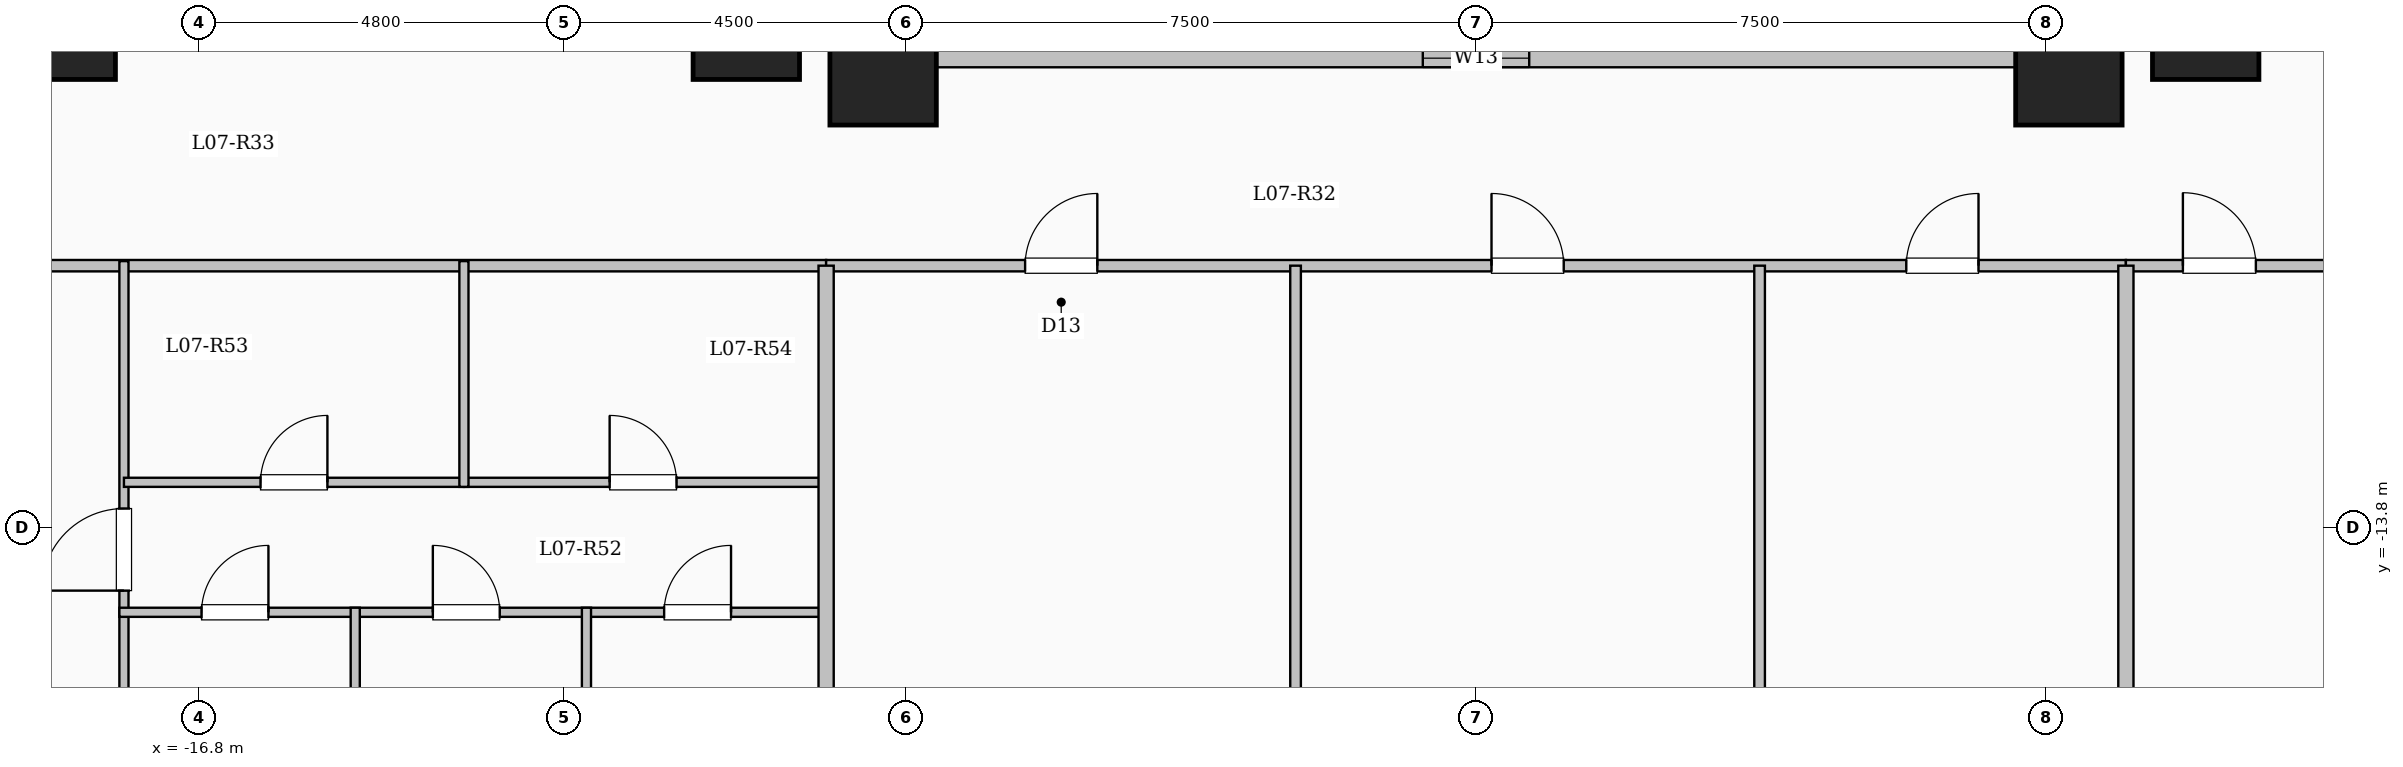
"""IFC4 building model, lengths in metres.
Left out: names, types, materials, properties, quantities, classifications, styles, units other than length and angle.
Written with IfcOpenShell. Run it as: python <this file> out.ifc"""

import sys

from ifc_helpers import new_model, si_unit, direction, frame, frame_2d, origin, origin_2d, place, context, subcontext, project, spatial, rectangle, extrude, element, fill, save


model = new_model("IFC4")
c1 = context("Model", 3, precision=1e-05, world=origin(), true_north=direction((0.0, 1.0)))
c2 = subcontext(c1, "Body", "Model", "MODEL_VIEW")
j1 = project(units=[si_unit("LENGTHUNIT", "METRE"), si_unit("PLANEANGLEUNIT", "RADIAN")], contexts=[c1])
p1 = place(None, origin())
s1 = spatial("IfcSite", under=j1, at=p1, CompositionType="ELEMENT")
p2 = place(p1, origin())
s2 = spatial("IfcBuilding", under=s1, at=p2, CompositionType="ELEMENT")
p3 = place(p2, frame((0.0, 0.0, 30.7)))
s3 = spatial("IfcBuildingStorey", under=s2, at=p3, CompositionType="ELEMENT", Elevation=30.7)
for number, where, z_axis, x_axis in (
    (1, (-7.8, -7.8, 0.0), (0.0, 0.0, 1.0), (1.0, 0.0, 0.0)),
    (2, (7.8, -7.8, 0.0), (0.0, 0.0, 1.0), (1.0, 0.0, 0.0)),
    (3, (-9.6, -7.2, 0.0), (0.0, 0.0, 1.0), (1.0, 0.0, 0.0)),
    (4, (9.6, -7.2, 0.0), (0.0, 0.0, 1.0), (1.0, 0.0, 0.0)),
    (5, (-18.6, -7.2, 0.0), (0.0, 0.0, 1.0), (1.0, 0.0, 0.0)),
):
    element("IfcColumn", number, at=place(p3, frame(where, z_axis=z_axis, x_axis=x_axis)), inside=s3, PredefinedType="COLUMN", context=c2, shape_type="SweptSolid", body=[
        extrude(rectangle(XDim=1.4, YDim=1.4, at=origin_2d()), origin(), (0.0, 0.0, 1.0), 3.35),
    ])
p4 = place(p3, frame((-7.62, -7.62, 0.0), z_axis=(0.0, 0.0, 1.0), x_axis=(1.0, 0.0, 0.0)))
e6 = element("IfcWall", 6, at=p4, inside=s3, PredefinedType="SOLIDWALL", context=c2, shape_type="SweptSolid", body=[
    extrude(rectangle(XDim=15.24, YDim=0.24, at=frame_2d((7.62, 0.0))), origin(), (0.0, 0.0, 1.0), 3.1),
])
p5 = place(p4, frame((6.92, 0.0, 0.95)))
e7 = element("IfcOpeningElement", 7, at=p5, cuts=e6, PredefinedType="OPENING", context=c2, shape_type="SweptSolid", body=[
    extrude(rectangle(XDim=1.4, YDim=1.5, at=frame_2d((0.7, 0.75))), frame((0.0, 0.13, 0.0), z_axis=(0.0, -1.0, 0.0), x_axis=(1.0, 0.0, 0.0)), (0.0, 0.0, 1.0), 0.26),
])
p6 = place(p3, frame((7.62, -7.62, 0.0), z_axis=(0.0, 0.0, 1.0), x_axis=(0.0, 1.0, 0.0)))
e8 = element("IfcWall", 8, at=p6, inside=s3, PredefinedType="SOLIDWALL", context=c2, shape_type="SweptSolid", body=[
    extrude(rectangle(XDim=15.24, YDim=0.24, at=frame_2d((7.62, 0.0))), origin(), (0.0, 0.0, 1.0), 3.1),
])
p7 = place(p6, frame((6.92, 0.0, 0.95)))
e9 = element("IfcOpeningElement", 9, at=p7, cuts=e8, PredefinedType="OPENING", context=c2, shape_type="SweptSolid", body=[
    extrude(rectangle(XDim=1.4, YDim=1.5, at=frame_2d((0.7, 0.75))), frame((0.0, 0.13, 0.0), z_axis=(0.0, -1.0, 0.0), x_axis=(1.0, 0.0, 0.0)), (0.0, 0.0, 1.0), 0.26),
])
p8 = place(p3, frame((-7.62, 7.62, 0.0), z_axis=(0.0, 0.0, 1.0), x_axis=(0.0, -1.0, 0.0)))
e10 = element("IfcWall", 10, at=p8, inside=s3, PredefinedType="SOLIDWALL", context=c2, shape_type="SweptSolid", body=[
    extrude(rectangle(XDim=15.24, YDim=0.24, at=frame_2d((7.62, 0.0))), origin(), (0.0, 0.0, 1.0), 3.1),
])
p9 = place(p8, frame((6.92, 0.0, 0.95)))
e11 = element("IfcOpeningElement", 11, at=p9, cuts=e10, PredefinedType="OPENING", context=c2, shape_type="SweptSolid", body=[
    extrude(rectangle(XDim=1.4, YDim=1.5, at=frame_2d((0.7, 0.75))), frame((0.0, 0.13, 0.0), z_axis=(0.0, -1.0, 0.0), x_axis=(1.0, 0.0, 0.0)), (0.0, 0.0, 1.0), 0.26),
])
p10 = place(p3, frame((-22.55, -10.35, 0.0), z_axis=(0.0, 0.0, 1.0), x_axis=(1.0, 0.0, 0.0)))
e12 = element("IfcWall", 12, at=p10, inside=s3, PredefinedType="PARTITIONING", context=c2, shape_type="SweptSolid", body=[
    extrude(rectangle(XDim=14.0, YDim=0.15, at=frame_2d((7.0, 0.0))), origin(), (0.0, 0.0, 1.0), 3.1),
])
p11 = place(p10, frame((0.7, 0.0, 0.0)))
e13 = element("IfcOpeningElement", 13, at=p11, cuts=e12, PredefinedType="OPENING", context=c2, shape_type="SweptSolid", body=[
    extrude(rectangle(XDim=0.96, YDim=2.15, at=frame_2d((0.48, 1.075))), frame((0.0, 0.085, 0.0), z_axis=(0.0, -1.0, 0.0), x_axis=(1.0, 0.0, 0.0)), (0.0, 0.0, 1.0), 0.17),
])
p12 = place(p3, frame((-8.55, -10.35, 0.0), z_axis=(0.0, 0.0, 1.0), x_axis=(1.0, 0.0, 0.0)))
e14 = element("IfcWall", 14, at=p12, inside=s3, PredefinedType="PARTITIONING", context=c2, shape_type="SweptSolid", body=[
    extrude(rectangle(XDim=17.1, YDim=0.15, at=frame_2d((8.55, 0.0))), origin(), (0.0, 0.0, 1.0), 3.1),
])
p13 = place(p12, frame((2.618, 0.0, 0.0)))
e15 = element("IfcOpeningElement", 15, at=p13, cuts=e14, PredefinedType="OPENING", context=c2, shape_type="SweptSolid", body=[
    extrude(rectangle(XDim=0.95, YDim=2.15, at=frame_2d((0.475, 1.075))), frame((0.0, 0.085, 0.0), z_axis=(0.0, -1.0, 0.0), x_axis=(1.0, 0.0, 0.0)), (0.0, 0.0, 1.0), 0.17),
])
p14 = place(p12, frame((8.754, 0.0, 0.0)))
e16 = element("IfcOpeningElement", 16, at=p14, cuts=e14, PredefinedType="OPENING", context=c2, shape_type="SweptSolid", body=[
    extrude(rectangle(XDim=0.95, YDim=2.15, at=frame_2d((0.475, 1.075))), frame((0.0, 0.085, 0.0), z_axis=(0.0, -1.0, 0.0), x_axis=(1.0, 0.0, 0.0)), (0.0, 0.0, 1.0), 0.17),
])
p15 = place(p12, frame((14.211, 0.0, 0.0)))
e17 = element("IfcOpeningElement", 17, at=p15, cuts=e14, PredefinedType="OPENING", context=c2, shape_type="SweptSolid", body=[
    extrude(rectangle(XDim=0.95, YDim=2.15, at=frame_2d((0.475, 1.075))), frame((0.0, 0.085, 0.0), z_axis=(0.0, -1.0, 0.0), x_axis=(1.0, 0.0, 0.0)), (0.0, 0.0, 1.0), 0.17),
])
p16 = place(p3, frame((8.55, -10.35, 0.0), z_axis=(0.0, 0.0, 1.0), x_axis=(1.0, 0.0, 0.0)))
e18 = element("IfcWall", 18, at=p16, inside=s3, PredefinedType="PARTITIONING", context=c2, shape_type="SweptSolid", body=[
    extrude(rectangle(XDim=14.0, YDim=0.15, at=frame_2d((7.0, 0.0))), origin(), (0.0, 0.0, 1.0), 3.1),
])
p17 = place(p16, frame((0.75, 0.0, 0.0)))
e19 = element("IfcOpeningElement", 19, at=p17, cuts=e18, PredefinedType="OPENING", context=c2, shape_type="SweptSolid", body=[
    extrude(rectangle(XDim=0.96, YDim=2.15, at=frame_2d((0.48, 1.075))), frame((0.0, 0.085, 0.0), z_axis=(0.0, -1.0, 0.0), x_axis=(1.0, 0.0, 0.0)), (0.0, 0.0, 1.0), 0.17),
])
p18 = place(p3, frame((-17.788, -23.6, 0.0), z_axis=(0.0, 0.0, 1.0), x_axis=(0.0, 1.0, 0.0)))
e20 = element("IfcWall", 20, at=p18, inside=s3, PredefinedType="PARTITIONING", context=c2, shape_type="SweptSolid", body=[
    extrude(rectangle(XDim=13.31, YDim=0.12, at=frame_2d((6.655, 0.0))), origin(), (0.0, 0.0, 1.0), 3.1),
])
p19 = place(p18, frame((8.975, 0.0, 0.0)))
e21 = element("IfcOpeningElement", 21, at=p19, cuts=e20, PredefinedType="OPENING", context=c2, shape_type="SweptSolid", body=[
    extrude(rectangle(XDim=1.08, YDim=2.15, at=frame_2d((0.54, 1.075))), frame((0.0, 0.07, 0.0), z_axis=(0.0, -1.0, 0.0), x_axis=(1.0, 0.0, 0.0)), (0.0, 0.0, 1.0), 0.14),
])
p20 = place(p3, frame((-17.788, -13.2, 0.0), z_axis=(0.0, 0.0, 1.0), x_axis=(1.0, 0.0, 0.0)))
e22 = element("IfcWall", 22, at=p20, inside=s3, PredefinedType="PARTITIONING", context=c2, shape_type="SweptSolid", body=[
    extrude(rectangle(XDim=4.473, YDim=0.12, at=frame_2d((2.237, 0.0))), origin(), (0.0, 0.0, 1.0), 3.1),
])
p21 = place(p20, frame((1.797, 0.0, 0.0)))
e23 = element("IfcOpeningElement", 23, at=p21, cuts=e22, PredefinedType="OPENING", context=c2, shape_type="SweptSolid", body=[
    extrude(rectangle(XDim=0.88, YDim=2.1, at=frame_2d((0.44, 1.05))), frame((0.0, 0.07, 0.0), z_axis=(0.0, -1.0, 0.0), x_axis=(1.0, 0.0, 0.0)), (0.0, 0.0, 1.0), 0.14),
])
p22 = place(p3, frame((-13.315, -13.2, 0.0), z_axis=(0.0, 0.0, 1.0), x_axis=(1.0, 0.0, 0.0)))
e24 = element("IfcWall", 24, at=p22, inside=s3, PredefinedType="PARTITIONING", context=c2, shape_type="SweptSolid", body=[
    extrude(rectangle(XDim=4.715, YDim=0.12, at=frame_2d((2.357, 0.0))), origin(), (0.0, 0.0, 1.0), 3.1),
])
p23 = place(p22, frame((1.917, 0.0, 0.0)))
e25 = element("IfcOpeningElement", 25, at=p23, cuts=e24, PredefinedType="OPENING", context=c2, shape_type="SweptSolid", body=[
    extrude(rectangle(XDim=0.88, YDim=2.1, at=frame_2d((0.44, 1.05))), frame((0.0, 0.07, 0.0), z_axis=(0.0, -1.0, 0.0), x_axis=(1.0, 0.0, 0.0)), (0.0, 0.0, 1.0), 0.14),
])
p24 = place(p3, frame((-17.848, -14.91, 0.0), z_axis=(0.0, 0.0, 1.0), x_axis=(1.0, 0.0, 0.0)))
e26 = element("IfcWall", 26, at=p24, inside=s3, PredefinedType="PARTITIONING", context=c2, shape_type="SweptSolid", body=[
    extrude(rectangle(XDim=9.308, YDim=0.12, at=frame_2d((4.654, 0.0))), origin(), (0.0, 0.0, 1.0), 2.585),
])
p25 = place(p24, frame((1.081, 0.0, 0.0)))
e27 = element("IfcOpeningElement", 27, at=p25, cuts=e26, PredefinedType="OPENING", context=c2, shape_type="SweptSolid", body=[
    extrude(rectangle(XDim=0.88, YDim=2.1, at=frame_2d((0.44, 1.05))), frame((0.0, 0.07, 0.0), z_axis=(0.0, -1.0, 0.0), x_axis=(1.0, 0.0, 0.0)), (0.0, 0.0, 1.0), 0.14),
])
p26 = place(p24, frame((4.124, 0.0, 0.0)))
e28 = element("IfcOpeningElement", 28, at=p26, cuts=e26, PredefinedType="OPENING", context=c2, shape_type="SweptSolid", body=[
    extrude(rectangle(XDim=0.88, YDim=2.1, at=frame_2d((0.44, 1.05))), frame((0.0, 0.07, 0.0), z_axis=(0.0, -1.0, 0.0), x_axis=(1.0, 0.0, 0.0)), (0.0, 0.0, 1.0), 0.14),
])
p27 = place(p24, frame((7.167, 0.0, 0.0)))
e29 = element("IfcOpeningElement", 29, at=p27, cuts=e26, PredefinedType="OPENING", context=c2, shape_type="SweptSolid", body=[
    extrude(rectangle(XDim=0.88, YDim=2.1, at=frame_2d((0.44, 1.05))), frame((0.0, 0.07, 0.0), z_axis=(0.0, -1.0, 0.0), x_axis=(1.0, 0.0, 0.0)), (0.0, 0.0, 1.0), 0.14),
])
p28 = place(p3, frame((-13.315, -13.26, 0.0), z_axis=(0.0, 0.0, 1.0), x_axis=(0.0, 1.0, 0.0)))
e30 = element("IfcWall", 30, at=p28, inside=s3, PredefinedType="PARTITIONING", context=c2, shape_type="SweptSolid", body=[
    extrude(rectangle(XDim=2.97, YDim=0.12, at=frame_2d((1.485, 0.0))), origin(), (0.0, 0.0, 1.0), 3.1),
])
p29 = place(p3, frame((-14.745, -23.6, 0.0), z_axis=(0.0, 0.0, 1.0), x_axis=(0.0, 1.0, 0.0)))
e31 = element("IfcWall", 31, at=p29, inside=s3, PredefinedType="PARTITIONING", context=c2, shape_type="SweptSolid", body=[
    extrude(rectangle(XDim=8.75, YDim=0.12, at=frame_2d((4.375, 0.0))), origin(), (0.0, 0.0, 1.0), 2.435),
])
p30 = place(p3, frame((-11.703, -23.6, 0.0), z_axis=(0.0, 0.0, 1.0), x_axis=(0.0, 1.0, 0.0)))
e32 = element("IfcWall", 32, at=p30, inside=s3, PredefinedType="PARTITIONING", context=c2, shape_type="SweptSolid", body=[
    extrude(rectangle(XDim=8.75, YDim=0.12, at=frame_2d((4.375, 0.0))), origin(), (0.0, 0.0, 1.0), 3.1),
])
for number, where, z_axis, x_axis in (
    (33, (-8.55, -24.204, 0.0), (0.0, 0.0, 1.0), (0.0, 1.0, 0.0)),
    (34, (8.55, -24.204, 0.0), (0.0, 0.0, 1.0), (0.0, 1.0, 0.0)),
):
    element("IfcWall", number, at=place(p3, frame(where, z_axis=z_axis, x_axis=x_axis)), inside=s3, PredefinedType="SOLIDWALL", context=c2, shape_type="SweptSolid", body=[
        extrude(rectangle(XDim=13.854, YDim=0.2, at=frame_2d((6.927, 0.0))), origin(), (0.0, 0.0, 1.0), 3.1),
    ])
for number, where, z_axis, x_axis in (
    (35, (-2.374, -23.55, 0.0), (0.0, 0.0, 1.0), (0.0, 1.0, 0.0)),
    (36, (3.731, -23.55, 0.0), (0.0, 0.0, 1.0), (0.0, 1.0, 0.0)),
):
    element("IfcWall", number, at=place(p3, frame(where, z_axis=z_axis, x_axis=x_axis)), inside=s3, PredefinedType="PARTITIONING", context=c2, shape_type="SweptSolid", body=[
        extrude(rectangle(XDim=13.2, YDim=0.14, at=frame_2d((6.6, 0.0))), origin(), (0.0, 0.0, 1.0), 3.1),
    ])
p31 = place(p5, origin())
e37 = element("IfcWindow", 37, at=p31, inside=s3, PartitioningType="SINGLE_PANEL", PredefinedType="WINDOW", context=c2, shape_type="SweptSolid", body=[
    extrude(rectangle(XDim=1.4, YDim=1.5, at=frame_2d((0.7, 0.75))), frame((0.0, 0.03, 0.0), z_axis=(0.0, -1.0, 0.0), x_axis=(1.0, 0.0, 0.0)), (0.0, 0.0, 1.0), 0.06),
])
fill(e7, e37)
p32 = place(p19, origin())
e38 = element("IfcDoor", 38, at=p32, inside=s3, OperationType="SINGLE_SWING_LEFT", PredefinedType="DOOR", context=c2, shape_type="SweptSolid", body=[
    extrude(rectangle(XDim=1.08, YDim=2.15, at=frame_2d((0.54, 1.075))), frame((0.0, 0.025, 0.0), z_axis=(0.0, -1.0, 0.0), x_axis=(1.0, 0.0, 0.0)), (0.0, 0.0, 1.0), 0.05),
])
fill(e21, e38)
p33 = place(p21, origin())
e39 = element("IfcDoor", 39, at=p33, inside=s3, OperationType="SINGLE_SWING_RIGHT", PredefinedType="DOOR", context=c2, shape_type="SweptSolid", body=[
    extrude(rectangle(XDim=0.88, YDim=2.1, at=frame_2d((0.44, 1.05))), frame((0.0, 0.025, 0.0), z_axis=(0.0, -1.0, 0.0), x_axis=(1.0, 0.0, 0.0)), (0.0, 0.0, 1.0), 0.05),
])
fill(e23, e39)
p34 = place(p23, origin())
e40 = element("IfcDoor", 40, at=p34, inside=s3, OperationType="SINGLE_SWING_LEFT", PredefinedType="DOOR", context=c2, shape_type="SweptSolid", body=[
    extrude(rectangle(XDim=0.88, YDim=2.1, at=frame_2d((0.44, 1.05))), frame((0.0, 0.025, 0.0), z_axis=(0.0, -1.0, 0.0), x_axis=(1.0, 0.0, 0.0)), (0.0, 0.0, 1.0), 0.05),
])
fill(e25, e40)
p35 = place(p25, origin())
e41 = element("IfcDoor", 41, at=p35, inside=s3, OperationType="SINGLE_SWING_RIGHT", PredefinedType="DOOR", context=c2, shape_type="SweptSolid", body=[
    extrude(rectangle(XDim=0.88, YDim=2.1, at=frame_2d((0.44, 1.05))), frame((0.0, 0.025, 0.0), z_axis=(0.0, -1.0, 0.0), x_axis=(1.0, 0.0, 0.0)), (0.0, 0.0, 1.0), 0.05),
])
fill(e27, e41)
p36 = place(p26, origin())
e42 = element("IfcDoor", 42, at=p36, inside=s3, OperationType="SINGLE_SWING_LEFT", PredefinedType="DOOR", context=c2, shape_type="SweptSolid", body=[
    extrude(rectangle(XDim=0.88, YDim=2.1, at=frame_2d((0.44, 1.05))), frame((0.0, 0.025, 0.0), z_axis=(0.0, -1.0, 0.0), x_axis=(1.0, 0.0, 0.0)), (0.0, 0.0, 1.0), 0.05),
])
fill(e28, e42)
p37 = place(p27, origin())
e43 = element("IfcDoor", 43, at=p37, inside=s3, OperationType="SINGLE_SWING_RIGHT", PredefinedType="DOOR", context=c2, shape_type="SweptSolid", body=[
    extrude(rectangle(XDim=0.88, YDim=2.1, at=frame_2d((0.44, 1.05))), frame((0.0, 0.025, 0.0), z_axis=(0.0, -1.0, 0.0), x_axis=(1.0, 0.0, 0.0)), (0.0, 0.0, 1.0), 0.05),
])
fill(e29, e43)
p38 = place(p17, origin())
e44 = element("IfcDoor", 44, at=p38, inside=s3, OperationType="SINGLE_SWING_LEFT", PredefinedType="DOOR", context=c2, shape_type="SweptSolid", body=[
    extrude(rectangle(XDim=0.96, YDim=2.15, at=frame_2d((0.48, 1.075))), frame((0.0, 0.025, 0.0), z_axis=(0.0, -1.0, 0.0), x_axis=(1.0, 0.0, 0.0)), (0.0, 0.0, 1.0), 0.05),
])
fill(e19, e44)
p39 = place(p13, origin())
e45 = element("IfcDoor", 45, at=p39, inside=s3, OperationType="SINGLE_SWING_RIGHT", PredefinedType="DOOR", context=c2, shape_type="SweptSolid", body=[
    extrude(rectangle(XDim=0.95, YDim=2.15, at=frame_2d((0.475, 1.075))), frame((0.0, 0.025, 0.0), z_axis=(0.0, -1.0, 0.0), x_axis=(1.0, 0.0, 0.0)), (0.0, 0.0, 1.0), 0.05),
])
fill(e15, e45)
p40 = place(p14, origin())
e46 = element("IfcDoor", 46, at=p40, inside=s3, OperationType="SINGLE_SWING_LEFT", PredefinedType="DOOR", context=c2, shape_type="SweptSolid", body=[
    extrude(rectangle(XDim=0.95, YDim=2.15, at=frame_2d((0.475, 1.075))), frame((0.0, 0.025, 0.0), z_axis=(0.0, -1.0, 0.0), x_axis=(1.0, 0.0, 0.0)), (0.0, 0.0, 1.0), 0.05),
])
fill(e16, e46)
p41 = place(p15, origin())
e47 = element("IfcDoor", 47, at=p41, inside=s3, OperationType="SINGLE_SWING_RIGHT", PredefinedType="DOOR", context=c2, shape_type="SweptSolid", body=[
    extrude(rectangle(XDim=0.95, YDim=2.15, at=frame_2d((0.475, 1.075))), frame((0.0, 0.025, 0.0), z_axis=(0.0, -1.0, 0.0), x_axis=(1.0, 0.0, 0.0)), (0.0, 0.0, 1.0), 0.05),
])
fill(e17, e47)
save(model, sys.argv[1])
